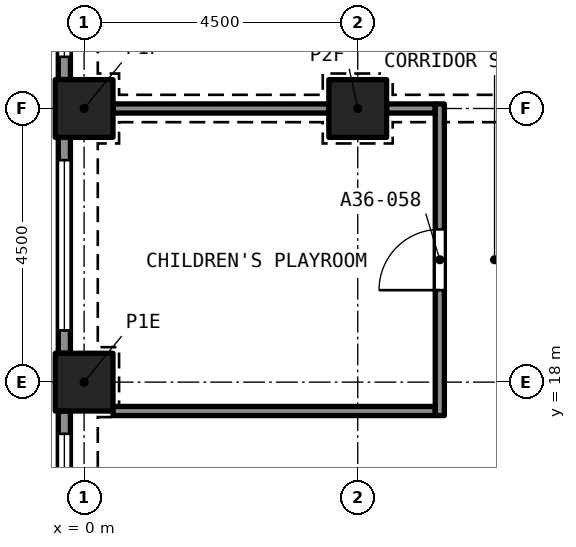
"""IFC4 building model, lengths in metres.
Left out: names, types, materials, properties, quantities, classifications, styles, units other than length and angle.
Written with IfcOpenShell. Run it as: python <this file> out.ifc"""

import sys

from ifc_helpers import new_model, si_unit, direction, frame, frame_2d, origin, origin_2d, place, context, subcontext, project, spatial, rectangle, extrude, element, fill, save


model = new_model("IFC4")
c1 = context("Model", 3, precision=1e-05, world=origin(), true_north=direction((0.0, 1.0)))
c2 = subcontext(c1, "Body", "Model", "MODEL_VIEW")
j1 = project(units=[si_unit("LENGTHUNIT", "METRE"), si_unit("PLANEANGLEUNIT", "RADIAN")], contexts=[c1])
p1 = place(None, origin())
s1 = spatial("IfcSite", under=j1, at=p1, CompositionType="ELEMENT")
p2 = place(p1, origin())
s2 = spatial("IfcBuilding", under=s1, at=p2, CompositionType="ELEMENT")
p3 = place(p2, frame((0.0, 0.0, 130.2)))
s3 = spatial("IfcBuildingStorey", under=s2, at=p3, CompositionType="ELEMENT", Elevation=130.2)
for number, where, z_axis, x_axis in (
    (1, (0.0, 18.0, 0.0), (0.0, 0.0, 1.0), (1.0, 0.0, 0.0)),
    (2, (0.0, 22.5, 0.0), (0.0, 0.0, 1.0), (1.0, 0.0, 0.0)),
    (3, (4.5, 22.5, 0.0), (0.0, 0.0, 1.0), (1.0, 0.0, 0.0)),
):
    element("IfcColumn", number, at=place(p3, frame(where, z_axis=z_axis, x_axis=x_axis)), inside=s3, PredefinedType="COLUMN", context=c2, shape_type="SweptSolid", body=[
        extrude(rectangle(XDim=0.95, YDim=0.95, at=origin_2d()), origin(), (0.0, 0.0, 1.0), 3.2),
    ])
p4 = place(p3, frame((-0.325, 22.975, 0.0), z_axis=(0.0, 0.0, 1.0), x_axis=(0.0, 1.0, 0.0)))
e4 = element("IfcWall", 4, at=p4, inside=s3, PredefinedType="SOLIDWALL", context=c2, shape_type="SweptSolid", body=[
    extrude(rectangle(XDim=3.55, YDim=0.2, at=frame_2d((1.775, 0.0))), origin(), (0.0, 0.0, 1.0), 3.2),
])
p5 = place(p4, frame((0.375, 0.0, 0.45)))
e5 = element("IfcOpeningElement", 5, at=p5, cuts=e4, PredefinedType="OPENING", context=c2, shape_type="SweptSolid", body=[
    extrude(rectangle(XDim=2.8, YDim=1.95, at=frame_2d((1.4, 0.975))), frame((0.0, 0.11, 0.0), z_axis=(0.0, -1.0, 0.0), x_axis=(1.0, 0.0, 0.0)), (0.0, 0.0, 1.0), 0.22),
])
p6 = place(p3, frame((-0.325, 18.475, 0.0), z_axis=(0.0, 0.0, 1.0), x_axis=(0.0, 1.0, 0.0)))
e6 = element("IfcWall", 6, at=p6, inside=s3, PredefinedType="SOLIDWALL", context=c2, shape_type="SweptSolid", body=[
    extrude(rectangle(XDim=3.55, YDim=0.2, at=frame_2d((1.775, 0.0))), origin(), (0.0, 0.0, 1.0), 3.2),
])
p7 = place(p6, frame((0.375, 0.0, 0.45)))
e7 = element("IfcOpeningElement", 7, at=p7, cuts=e6, PredefinedType="OPENING", context=c2, shape_type="SweptSolid", body=[
    extrude(rectangle(XDim=2.8, YDim=1.95, at=frame_2d((1.4, 0.975))), frame((0.0, 0.11, 0.0), z_axis=(0.0, -1.0, 0.0), x_axis=(1.0, 0.0, 0.0)), (0.0, 0.0, 1.0), 0.22),
])
p8 = place(p3, frame((-0.325, 13.975, 0.0), z_axis=(0.0, 0.0, 1.0), x_axis=(0.0, 1.0, 0.0)))
e8 = element("IfcWall", 8, at=p8, inside=s3, PredefinedType="SOLIDWALL", context=c2, shape_type="SweptSolid", body=[
    extrude(rectangle(XDim=3.55, YDim=0.2, at=frame_2d((1.775, 0.0))), origin(), (0.0, 0.0, 1.0), 3.2),
])
p9 = place(p8, frame((0.375, 0.0, 0.45)))
e9 = element("IfcOpeningElement", 9, at=p9, cuts=e8, PredefinedType="OPENING", context=c2, shape_type="SweptSolid", body=[
    extrude(rectangle(XDim=2.8, YDim=1.95, at=frame_2d((1.4, 0.975))), frame((0.0, 0.11, 0.0), z_axis=(0.0, -1.0, 0.0), x_axis=(1.0, 0.0, 0.0)), (0.0, 0.0, 1.0), 0.22),
])
p10 = place(p3, frame((0.475, 17.525, 0.0), z_axis=(0.0, 0.0, 1.0), x_axis=(1.0, 0.0, 0.0)))
e10 = element("IfcWall", 10, at=p10, inside=s3, PredefinedType="PARTITIONING", context=c2, shape_type="SweptSolid", body=[
    extrude(rectangle(XDim=5.3, YDim=0.15, at=frame_2d((2.65, 0.0))), origin(), (0.0, 0.0, 1.0), 2.9),
])
p11 = place(p3, frame((4.975, 22.5, 0.0), z_axis=(0.0, 0.0, 1.0), x_axis=(1.0, 0.0, 0.0)))
e11 = element("IfcWall", 11, at=p11, inside=s3, PredefinedType="PARTITIONING", context=c2, shape_type="SweptSolid", body=[
    extrude(rectangle(XDim=0.8, YDim=0.15, at=frame_2d((0.4, 0.0))), origin(), (0.0, 0.0, 1.0), 2.38),
])
p12 = place(p3, frame((0.475, 22.5, 0.0), z_axis=(0.0, 0.0, 1.0), x_axis=(1.0, 0.0, 0.0)))
e12 = element("IfcWall", 12, at=p12, inside=s3, PredefinedType="PARTITIONING", context=c2, shape_type="SweptSolid", body=[
    extrude(rectangle(XDim=3.55, YDim=0.15, at=frame_2d((1.775, 0.0))), origin(), (0.0, 0.0, 1.0), 2.38),
])
p13 = place(p3, frame((5.85, 17.45, 0.0), z_axis=(0.0, 0.0, 1.0), x_axis=(0.0, 1.0, 0.0)))
e13 = element("IfcWall", 13, at=p13, inside=s3, PredefinedType="PARTITIONING", context=c2, shape_type="SweptSolid", body=[
    extrude(rectangle(XDim=5.125, YDim=0.15, at=frame_2d((2.562, 0.0))), origin(), (0.0, 0.0, 1.0), 2.9),
])
p14 = place(p13, frame((2.062, 0.0, 0.0)))
e14 = element("IfcOpeningElement", 14, at=p14, cuts=e13, PredefinedType="OPENING", context=c2, shape_type="SweptSolid", body=[
    extrude(rectangle(XDim=1.0, YDim=2.1, at=frame_2d((0.5, 1.05))), frame((0.0, 0.085, 0.0), z_axis=(0.0, -1.0, 0.0), x_axis=(1.0, 0.0, 0.0)), (0.0, 0.0, 1.0), 0.17),
])
p15 = place(p5, origin())
e15 = element("IfcWindow", 15, at=p15, inside=s3, PartitioningType="SINGLE_PANEL", PredefinedType="WINDOW", context=c2, shape_type="SweptSolid", body=[
    extrude(rectangle(XDim=2.8, YDim=1.95, at=frame_2d((1.4, 0.975))), frame((0.0, 0.03, 0.0), z_axis=(0.0, -1.0, 0.0), x_axis=(1.0, 0.0, 0.0)), (0.0, 0.0, 1.0), 0.06),
])
fill(e5, e15)
p16 = place(p7, origin())
e16 = element("IfcWindow", 16, at=p16, inside=s3, PartitioningType="SINGLE_PANEL", PredefinedType="WINDOW", context=c2, shape_type="SweptSolid", body=[
    extrude(rectangle(XDim=2.8, YDim=1.95, at=frame_2d((1.4, 0.975))), frame((0.0, 0.03, 0.0), z_axis=(0.0, -1.0, 0.0), x_axis=(1.0, 0.0, 0.0)), (0.0, 0.0, 1.0), 0.06),
])
fill(e7, e16)
p17 = place(p9, origin())
e17 = element("IfcWindow", 17, at=p17, inside=s3, PartitioningType="SINGLE_PANEL", PredefinedType="WINDOW", context=c2, shape_type="SweptSolid", body=[
    extrude(rectangle(XDim=2.8, YDim=1.95, at=frame_2d((1.4, 0.975))), frame((0.0, 0.03, 0.0), z_axis=(0.0, -1.0, 0.0), x_axis=(1.0, 0.0, 0.0)), (0.0, 0.0, 1.0), 0.06),
])
fill(e9, e17)
p18 = place(p14, origin())
e18 = element("IfcDoor", 18, at=p18, inside=s3, OperationType="SINGLE_SWING_RIGHT", PredefinedType="DOOR", context=c2, shape_type="SweptSolid", body=[
    extrude(rectangle(XDim=1.0, YDim=2.1, at=frame_2d((0.5, 1.05))), frame((0.0, 0.025, 0.0), z_axis=(0.0, -1.0, 0.0), x_axis=(1.0, 0.0, 0.0)), (0.0, 0.0, 1.0), 0.05),
])
fill(e14, e18)
save(model, sys.argv[1])
